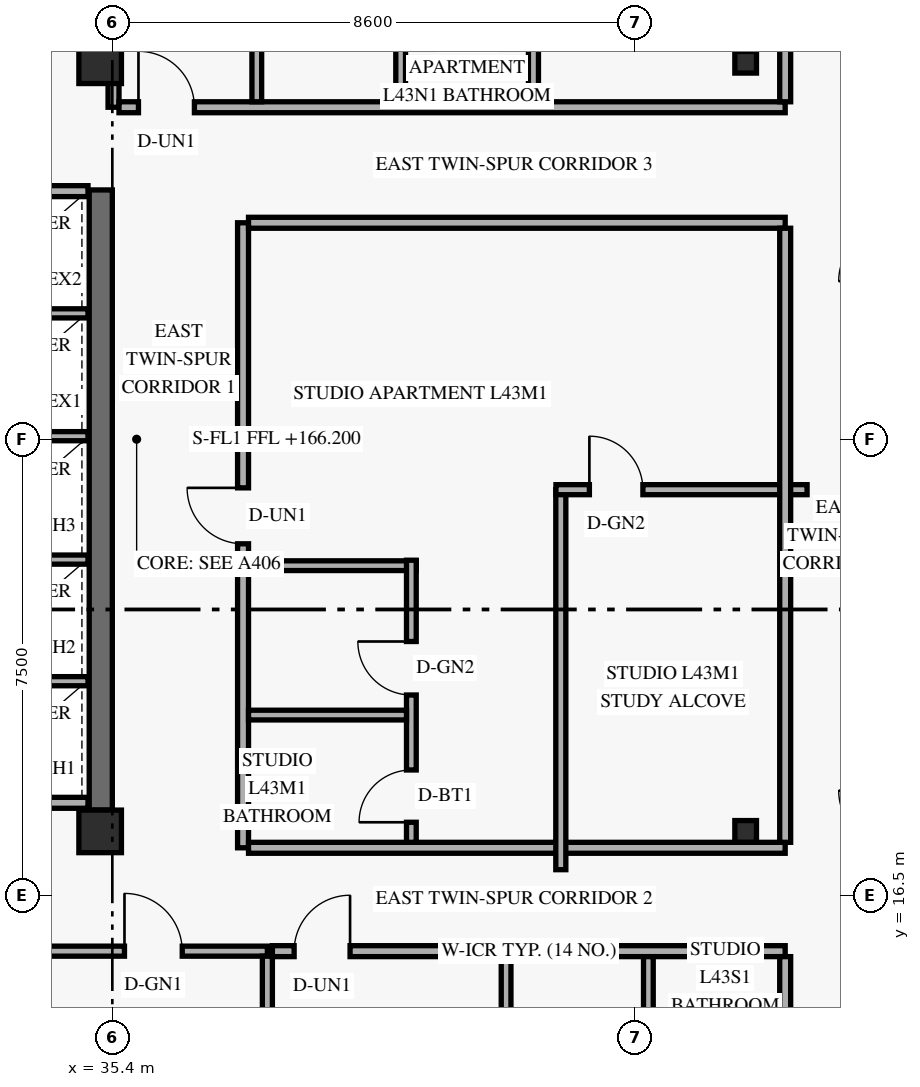
"""IFC4 building model, lengths in metres.
Left out: names, types, materials, properties, quantities, classifications, styles, units other than length and angle.
Written with IfcOpenShell. Run it as: python <this file> out.ifc"""

import sys

from ifc_helpers import new_model, si_unit, direction, frame, frame_2d, origin, origin_2d, place, context, subcontext, project, spatial, rectangle, hollow_rectangle, extrude, element, fill, save


model = new_model("IFC4")
c1 = context("Model", 3, precision=1e-05, world=origin(), true_north=direction((0.0, 1.0)))
c2 = subcontext(c1, "Body", "Model", "MODEL_VIEW")
j1 = project(units=[si_unit("LENGTHUNIT", "METRE"), si_unit("PLANEANGLEUNIT", "RADIAN")], contexts=[c1])
p1 = place(None, origin())
s1 = spatial("IfcSite", under=j1, at=p1, CompositionType="ELEMENT")
p2 = place(p1, origin())
s2 = spatial("IfcBuilding", under=s1, at=p2, CompositionType="ELEMENT")
p3 = place(p2, frame((0.0, 0.0, 166.2)))
s3 = spatial("IfcBuildingStorey", under=s2, at=p3, CompositionType="ELEMENT", Elevation=166.2)
p4 = place(p3, frame((35.21, 17.9, 0.0), z_axis=(0.0, 0.0, 1.0), x_axis=(0.0, 1.0, 0.0)))
e1 = element("IfcWall", 1, at=p4, inside=s3, PredefinedType="SHEAR", context=c2, shape_type="SweptSolid", body=[
    extrude(rectangle(XDim=10.2, YDim=0.38, at=frame_2d((5.1, 0.0))), origin(), (0.0, 0.0, 1.0), 2.748),
])
for number, where, z_axis, x_axis in (
    (2, (35.2, 17.55, 0.0), (0.0, 0.0, 1.0), (1.0, 0.0, 0.0)),
    (3, (35.2, 30.2, 0.0), (0.0, 0.0, 1.0), (1.0, 0.0, 0.0)),
):
    element("IfcColumn", number, at=place(p3, frame(where, z_axis=z_axis, x_axis=x_axis)), inside=s3, PredefinedType="COLUMN", context=c2, shape_type="SweptSolid", body=[
        extrude(rectangle(XDim=0.7, YDim=0.7, at=origin_2d()), origin(), (0.0, 0.0, 1.0), 3.6),
    ])
for number, where, z_axis, x_axis in (
    (4, (45.753, 17.55, 0.0), (0.035, 0.0, 0.999), (0.0, 1.0, 0.0)),
    (5, (45.753, 30.2, 0.0), (0.035, 0.0, 0.999), (0.0, 1.0, 0.0)),
):
    element("IfcColumn", number, at=place(p3, frame(where, z_axis=z_axis, x_axis=x_axis)), inside=s3, PredefinedType="COLUMN", context=c2, shape_type="SweptSolid", body=[
        extrude(hollow_rectangle(XDim=0.356, YDim=0.356, WallThickness=0.016, at=origin_2d()), origin(), (0.0, 0.0, 1.0), 3.602),
    ])
for number, where, z_axis, x_axis in (
    (6, (32.74, 18.02, 0.0), (0.0, 0.0, 1.0), (1.0, 0.0, 0.0)),
    (7, (32.74, 28.08, 0.0), (0.0, 0.0, 1.0), (1.0, 0.0, 0.0)),
):
    element("IfcWall", number, at=place(p3, frame(where, z_axis=z_axis, x_axis=x_axis)), inside=s3, PredefinedType="STANDARD", context=c2, shape_type="SweptSolid", body=[
        extrude(rectangle(XDim=2.26, YDim=0.18, at=frame_2d((1.13, 0.0))), origin(), (0.0, 0.0, 1.0), 3.36),
    ])
for number, where, z_axis, x_axis in (
    (8, (32.74, 20.02, 0.0), (0.0, 0.0, 1.0), (1.0, 0.0, 0.0)),
    (9, (32.74, 22.02, 0.0), (0.0, 0.0, 1.0), (1.0, 0.0, 0.0)),
    (10, (32.74, 24.05, 0.0), (0.0, 0.0, 1.0), (1.0, 0.0, 0.0)),
    (11, (32.74, 26.07, 0.0), (0.0, 0.0, 1.0), (1.0, 0.0, 0.0)),
):
    element("IfcWall", number, at=place(p3, frame(where, z_axis=z_axis, x_axis=x_axis)), inside=s3, PredefinedType="STANDARD", context=c2, shape_type="SweptSolid", body=[
        extrude(rectangle(XDim=2.26, YDim=0.15, at=frame_2d((1.13, 0.0))), origin(), (0.0, 0.0, 1.0), 3.36),
    ])
p5 = place(p3, frame((32.732, 15.58, 0.0), z_axis=(0.0, 0.0, 1.0), x_axis=(1.0, 0.0, 0.0)))
e12 = element("IfcWall", 12, at=p5, inside=s3, PredefinedType="PARTITIONING", context=c2, shape_type="SweptSolid", body=[
    extrude(rectangle(XDim=5.218, YDim=0.165, at=frame_2d((2.609, 0.0))), origin(), (0.0, 0.0, 1.0), 2.73),
])
p6 = place(p5, frame((2.867, 0.0, 0.0)))
e13 = element("IfcOpeningElement", 13, at=p6, cuts=e12, PredefinedType="OPENING", context=c2, shape_type="SweptSolid", body=[
    extrude(rectangle(XDim=0.95, YDim=2.15, at=frame_2d((0.475, 1.075))), frame((0.0, 0.093, 0.0), z_axis=(0.0, -1.0, 0.0), x_axis=(1.0, 0.0, 0.0)), (0.0, 0.0, 1.0), 0.185),
])
p7 = place(p3, frame((37.95, 9.25, 0.0), z_axis=(0.0, 0.0, 1.0), x_axis=(0.0, 1.0, 0.0)))
e14 = element("IfcWall", 14, at=p7, inside=s3, PredefinedType="PARTITIONING", context=c2, shape_type="SweptSolid", body=[
    extrude(rectangle(XDim=6.248, YDim=0.165, at=frame_2d((3.124, 0.0))), origin(), (0.0, 0.0, 1.0), 2.73),
])
p8 = place(p3, frame((37.55, 17.28, 0.0), z_axis=(0.0, 0.0, 1.0), x_axis=(0.0, 1.0, 0.0)))
e15 = element("IfcWall", 15, at=p8, inside=s3, PredefinedType="STANDARD", context=c2, shape_type="SweptSolid", body=[
    extrude(rectangle(XDim=10.28, YDim=0.18, at=frame_2d((5.14, 0.0))), origin(), (0.0, 0.0, 1.0), 2.73),
])
p9 = place(p8, frame((5.0, 0.0, 0.0)))
e16 = element("IfcOpeningElement", 16, at=p9, cuts=e15, PredefinedType="OPENING", context=c2, shape_type="SweptSolid", body=[
    extrude(rectangle(XDim=0.92, YDim=2.15, at=frame_2d((0.46, 1.075))), frame((0.0, 0.1, 0.0), z_axis=(0.0, -1.0, 0.0), x_axis=(1.0, 0.0, 0.0)), (0.0, 0.0, 1.0), 0.2),
])
p10 = place(p3, frame((38.032, 15.58, 0.0), z_axis=(0.0, 0.0, 1.0), x_axis=(1.0, 0.0, 0.0)))
e17 = element("IfcWall", 17, at=p10, inside=s3, PredefinedType="STANDARD", context=c2, shape_type="SweptSolid", body=[
    extrude(rectangle(XDim=8.434, YDim=0.18, at=frame_2d((4.217, 0.0))), origin(), (0.0, 0.0, 1.0), 2.73),
])
p11 = place(p10, frame((0.357, 0.0, 0.0)))
e18 = element("IfcOpeningElement", 18, at=p11, cuts=e17, PredefinedType="OPENING", context=c2, shape_type="SweptSolid", body=[
    extrude(rectangle(XDim=0.92, YDim=2.15, at=frame_2d((0.46, 1.075))), frame((0.0, 0.1, 0.0), z_axis=(0.0, -1.0, 0.0), x_axis=(1.0, 0.0, 0.0)), (0.0, 0.0, 1.0), 0.2),
])
for number, where, z_axis, x_axis in (
    (19, (37.64, 17.28, 0.0), (0.0, 0.0, 1.0), (1.0, 0.0, 0.0)),
    (20, (37.64, 27.56, 0.0), (0.0, 0.0, 1.0), (1.0, 0.0, 0.0)),
):
    element("IfcWall", number, at=place(p3, frame(where, z_axis=z_axis, x_axis=x_axis)), inside=s3, PredefinedType="STANDARD", context=c2, shape_type="SweptSolid", body=[
        extrude(rectangle(XDim=8.826, YDim=0.18, at=frame_2d((4.413, 0.0))), origin(), (0.0, 0.0, 1.0), 2.73),
    ])
p12 = place(p3, frame((35.42, 29.46, 0.0), z_axis=(0.0, 0.0, 1.0), x_axis=(0.0, 1.0, 0.0)))
e21 = element("IfcWall", 21, at=p12, inside=s3, PredefinedType="STANDARD", context=c2, shape_type="SweptSolid", body=[
    extrude(rectangle(XDim=1.89, YDim=0.18, at=frame_2d((0.945, 0.0))), origin(), (0.0, 0.0, 1.0), 2.73),
])
p13 = place(p3, frame((35.51, 29.46, 0.0), z_axis=(0.0, 0.0, 1.0), x_axis=(1.0, 0.0, 0.0)))
e22 = element("IfcWall", 22, at=p13, inside=s3, PredefinedType="STANDARD", context=c2, shape_type="SweptSolid", body=[
    extrude(rectangle(XDim=10.956, YDim=0.18, at=frame_2d((5.478, 0.0))), origin(), (0.0, 0.0, 1.0), 2.73),
])
p14 = place(p13, frame((0.32, 0.0, 0.0)))
e23 = element("IfcOpeningElement", 23, at=p14, cuts=e22, PredefinedType="OPENING", context=c2, shape_type="SweptSolid", body=[
    extrude(rectangle(XDim=0.92, YDim=2.15, at=frame_2d((0.46, 1.075))), frame((0.0, 0.1, 0.0), z_axis=(0.0, -1.0, 0.0), x_axis=(1.0, 0.0, 0.0)), (0.0, 0.0, 1.0), 0.2),
])
p15 = place(p3, frame((41.876, 13.06, 0.0), z_axis=(0.0, 0.0, 1.0), x_axis=(0.0, 1.0, 0.0)))
e24 = element("IfcWall", 24, at=p15, inside=s3, PredefinedType="PLUMBINGWALL", context=c2, shape_type="SweptSolid", body=[
    extrude(rectangle(XDim=2.43, YDim=0.16, at=frame_2d((1.215, 0.0))), origin(), (0.0, 0.0, 1.0), 2.984),
])
p16 = place(p3, frame((44.216, 13.22, 0.0), z_axis=(0.0, 0.0, 1.0), x_axis=(0.0, 1.0, 0.0)))
e25 = element("IfcWall", 25, at=p16, inside=s3, PredefinedType="PLUMBINGWALL", context=c2, shape_type="SweptSolid", body=[
    extrude(rectangle(XDim=2.27, YDim=0.16, at=frame_2d((1.135, 0.0))), origin(), (0.0, 0.0, 1.0), 2.984),
])
p17 = place(p3, frame((42.326, 29.55, 0.0), z_axis=(0.0, 0.0, 1.0), x_axis=(0.0, 1.0, 0.0)))
e26 = element("IfcWall", 26, at=p17, inside=s3, PredefinedType="PARTITIONING", context=c2, shape_type="SweptSolid", body=[
    extrude(rectangle(XDim=14.17, YDim=0.165, at=frame_2d((7.085, 0.0))), origin(), (0.0, 0.0, 1.0), 2.73),
])
p18 = place(p17, frame((4.593, 0.0, 0.0)))
e27 = element("IfcOpeningElement", 27, at=p18, cuts=e26, PredefinedType="OPENING", context=c2, shape_type="SweptSolid", body=[
    extrude(rectangle(XDim=0.88, YDim=2.14, at=frame_2d((0.44, 1.07))), frame((0.0, 0.093, 0.0), z_axis=(0.0, -1.0, 0.0), x_axis=(1.0, 0.0, 0.0)), (0.0, 0.0, 1.0), 0.185),
])
p19 = place(p17, frame((8.28, 0.0, 0.0)))
e28 = element("IfcOpeningElement", 28, at=p19, cuts=e26, PredefinedType="OPENING", context=c2, shape_type="SweptSolid", body=[
    extrude(rectangle(XDim=0.88, YDim=2.12, at=frame_2d((0.44, 1.06))), frame((0.0, 0.093, 0.0), z_axis=(0.0, -1.0, 0.0), x_axis=(1.0, 0.0, 0.0)), (0.0, 0.0, 1.0), 0.185),
])
p20 = place(p3, frame((37.776, 29.55, 0.0), z_axis=(0.0, 0.0, 1.0), x_axis=(0.0, 1.0, 0.0)))
e29 = element("IfcWall", 29, at=p20, inside=s3, PredefinedType="PLUMBINGWALL", context=c2, shape_type="SweptSolid", body=[
    extrude(rectangle(XDim=2.625, YDim=0.16, at=frame_2d((1.312, 0.0))), origin(), (0.0, 0.0, 1.0), 2.73),
])
p21 = place(p3, frame((40.142, 29.55, 0.0), z_axis=(0.0, 0.0, 1.0), x_axis=(0.0, 1.0, 0.0)))
e30 = element("IfcWall", 30, at=p21, inside=s3, PredefinedType="PLUMBINGWALL", context=c2, shape_type="SweptSolid", body=[
    extrude(rectangle(XDim=2.465, YDim=0.16, at=frame_2d((1.232, 0.0))), origin(), (0.0, 0.0, 1.0), 2.73),
])
p22 = place(p3, frame((37.64, 21.92, 0.0), z_axis=(0.0, 0.0, 1.0), x_axis=(1.0, 0.0, 0.0)))
e31 = element("IfcWall", 31, at=p22, inside=s3, PredefinedType="PLUMBINGWALL", context=c2, shape_type="SweptSolid", body=[
    extrude(rectangle(XDim=2.758, YDim=0.16, at=frame_2d((1.379, 0.0))), origin(), (0.0, 0.0, 1.0), 2.73),
])
p23 = place(p3, frame((40.318, 17.37, 0.0), z_axis=(0.0, 0.0, 1.0), x_axis=(0.0, 1.0, 0.0)))
e32 = element("IfcWall", 32, at=p23, inside=s3, PredefinedType="PLUMBINGWALL", context=c2, shape_type="SweptSolid", body=[
    extrude(rectangle(XDim=4.64, YDim=0.16, at=frame_2d((2.32, 0.0))), origin(), (0.0, 0.0, 1.0), 2.73),
])
p24 = place(p23, frame((0.33, 0.0, 0.0)))
e33 = element("IfcOpeningElement", 33, at=p24, cuts=e32, PredefinedType="OPENING", context=c2, shape_type="SweptSolid", body=[
    extrude(rectangle(XDim=0.86, YDim=2.12, at=frame_2d((0.43, 1.06))), frame((0.0, 0.09, 0.0), z_axis=(0.0, -1.0, 0.0), x_axis=(1.0, 0.0, 0.0)), (0.0, 0.0, 1.0), 0.18),
])
p25 = place(p23, frame((2.423, 0.0, 0.0)))
e34 = element("IfcOpeningElement", 34, at=p25, cuts=e32, PredefinedType="OPENING", context=c2, shape_type="SweptSolid", body=[
    extrude(rectangle(XDim=0.88, YDim=2.12, at=frame_2d((0.44, 1.06))), frame((0.0, 0.09, 0.0), z_axis=(0.0, -1.0, 0.0), x_axis=(1.0, 0.0, 0.0)), (0.0, 0.0, 1.0), 0.18),
])
p26 = place(p3, frame((37.64, 19.463, 0.0), z_axis=(0.0, 0.0, 1.0), x_axis=(1.0, 0.0, 0.0)))
e35 = element("IfcWall", 35, at=p26, inside=s3, PredefinedType="PLUMBINGWALL", context=c2, shape_type="SweptSolid", body=[
    extrude(rectangle(XDim=2.598, YDim=0.16, at=frame_2d((1.299, 0.0))), origin(), (0.0, 0.0, 1.0), 3.36),
])
p27 = place(p3, frame((42.776, 16.92, 0.0), z_axis=(0.0, 0.0, 1.0), x_axis=(0.0, 1.0, 0.0)))
e36 = element("IfcWall", 36, at=p27, inside=s3, PredefinedType="PARTITIONING", context=c2, shape_type="SweptSolid", body=[
    extrude(rectangle(XDim=6.25, YDim=0.165, at=frame_2d((3.125, 0.0))), origin(), (0.0, 0.0, 1.0), 2.73),
])
p28 = place(p3, frame((42.696, 23.17, 0.0), z_axis=(0.0, 0.0, 1.0), x_axis=(1.0, 0.0, 0.0)))
e37 = element("IfcWall", 37, at=p28, inside=s3, PredefinedType="PARTITIONING", context=c2, shape_type="SweptSolid", body=[
    extrude(rectangle(XDim=4.13, YDim=0.165, at=frame_2d((2.065, 0.0))), origin(), (0.0, 0.0, 1.0), 2.73),
])
p29 = place(p28, frame((0.55, 0.0, 0.0)))
e38 = element("IfcOpeningElement", 38, at=p29, cuts=e37, PredefinedType="OPENING", context=c2, shape_type="SweptSolid", body=[
    extrude(rectangle(XDim=0.88, YDim=2.12, at=frame_2d((0.44, 1.06))), frame((0.0, 0.093, 0.0), z_axis=(0.0, -1.0, 0.0), x_axis=(1.0, 0.0, 0.0)), (0.0, 0.0, 1.0), 0.185),
])
p30 = place(p3, frame((46.466, 4.28, 0.0), z_axis=(0.0, 0.0, 1.0), x_axis=(0.0, 1.0, 0.0)))
e39 = element("IfcWall", 39, at=p30, inside=s3, PredefinedType="STANDARD", context=c2, shape_type="SweptSolid", body=[
    extrude(rectangle(XDim=11.21, YDim=0.18, at=frame_2d((5.605, 0.0))), origin(), (0.0, 0.0, 1.0), 2.73),
])
p31 = place(p3, frame((46.466, 17.37, 0.0), z_axis=(0.0, 0.0, 1.0), x_axis=(0.0, 1.0, 0.0)))
e40 = element("IfcWall", 40, at=p31, inside=s3, PredefinedType="STANDARD", context=c2, shape_type="SweptSolid", body=[
    extrude(rectangle(XDim=10.1, YDim=0.18, at=frame_2d((5.05, 0.0))), origin(), (0.0, 0.0, 1.0), 2.73),
])
p32 = place(p3, frame((46.466, 29.55, 0.0), z_axis=(0.0, 0.0, 1.0), x_axis=(0.0, 1.0, 0.0)))
e41 = element("IfcWall", 41, at=p32, inside=s3, PredefinedType="STANDARD", context=c2, shape_type="SweptSolid", body=[
    extrude(rectangle(XDim=14.17, YDim=0.18, at=frame_2d((7.085, 0.0))), origin(), (0.0, 0.0, 1.0), 2.73),
])
p33 = place(p6, origin())
e42 = element("IfcDoor", 42, at=p33, inside=s3, OperationType="SINGLE_SWING_LEFT", PredefinedType="DOOR", context=c2, shape_type="SweptSolid", body=[
    extrude(rectangle(XDim=0.95, YDim=2.15, at=frame_2d((0.475, 1.075))), frame((0.0, 0.025, 0.0), z_axis=(0.0, -1.0, 0.0), x_axis=(1.0, 0.0, 0.0)), (0.0, 0.0, 1.0), 0.05),
])
fill(e13, e42)
p34 = place(p11, origin())
e43 = element("IfcDoor", 43, at=p34, inside=s3, OperationType="SINGLE_SWING_RIGHT", PredefinedType="DOOR", context=c2, shape_type="SweptSolid", body=[
    extrude(rectangle(XDim=0.92, YDim=2.15, at=frame_2d((0.46, 1.075))), frame((0.0, 0.025, 0.0), z_axis=(0.0, -1.0, 0.0), x_axis=(1.0, 0.0, 0.0)), (0.0, 0.0, 1.0), 0.05),
])
fill(e18, e43)
p35 = place(p14, origin())
e44 = element("IfcDoor", 44, at=p35, inside=s3, OperationType="SINGLE_SWING_LEFT", PredefinedType="DOOR", context=c2, shape_type="SweptSolid", body=[
    extrude(rectangle(XDim=0.92, YDim=2.15, at=frame_2d((0.46, 1.075))), frame((0.0, 0.025, 0.0), z_axis=(0.0, -1.0, 0.0), x_axis=(1.0, 0.0, 0.0)), (0.0, 0.0, 1.0), 0.05),
])
fill(e23, e44)
p36 = place(p29, origin())
e45 = element("IfcDoor", 45, at=p36, inside=s3, OperationType="SINGLE_SWING_LEFT", PredefinedType="DOOR", context=c2, shape_type="SweptSolid", body=[
    extrude(rectangle(XDim=0.88, YDim=2.12, at=frame_2d((0.44, 1.06))), frame((0.0, 0.025, 0.0), z_axis=(0.0, -1.0, 0.0), x_axis=(1.0, 0.0, 0.0)), (0.0, 0.0, 1.0), 0.05),
])
fill(e38, e45)
p37 = place(p9, origin())
e46 = element("IfcDoor", 46, at=p37, inside=s3, OperationType="SINGLE_SWING_RIGHT", PredefinedType="DOOR", context=c2, shape_type="SweptSolid", body=[
    extrude(rectangle(XDim=0.92, YDim=2.15, at=frame_2d((0.46, 1.075))), frame((0.0, 0.025, 0.0), z_axis=(0.0, -1.0, 0.0), x_axis=(1.0, 0.0, 0.0)), (0.0, 0.0, 1.0), 0.05),
])
fill(e16, e46)
p38 = place(p24, origin())
e47 = element("IfcDoor", 47, at=p38, inside=s3, OperationType="SINGLE_SWING_LEFT", PredefinedType="DOOR", context=c2, shape_type="SweptSolid", body=[
    extrude(rectangle(XDim=0.86, YDim=2.12, at=frame_2d((0.43, 1.06))), frame((0.0, 0.025, 0.0), z_axis=(0.0, -1.0, 0.0), x_axis=(1.0, 0.0, 0.0)), (0.0, 0.0, 1.0), 0.05),
])
fill(e33, e47)
p39 = place(p25, origin())
e48 = element("IfcDoor", 48, at=p39, inside=s3, OperationType="SINGLE_SWING_RIGHT", PredefinedType="DOOR", context=c2, shape_type="SweptSolid", body=[
    extrude(rectangle(XDim=0.88, YDim=2.12, at=frame_2d((0.44, 1.06))), frame((0.0, 0.025, 0.0), z_axis=(0.0, -1.0, 0.0), x_axis=(1.0, 0.0, 0.0)), (0.0, 0.0, 1.0), 0.05),
])
fill(e34, e48)
save(model, sys.argv[1])
